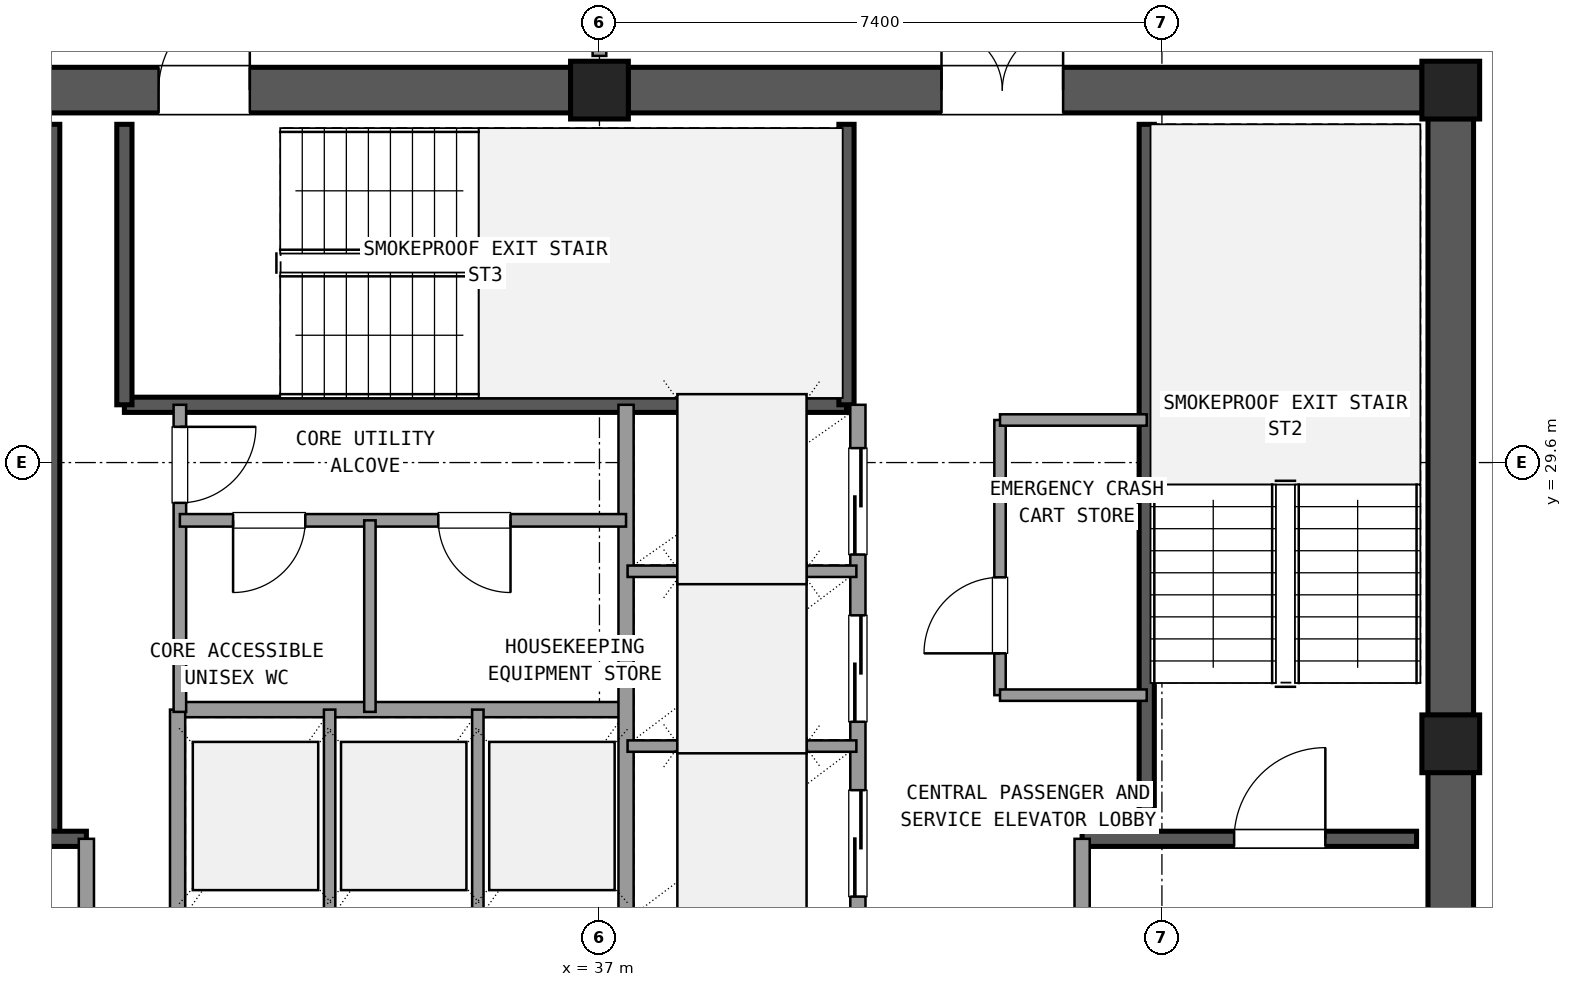
"""IFC4 building model, lengths in metres.
Left out: names, types, materials, properties, quantities, classifications, styles, units other than length and angle.
Written with IfcOpenShell. Run it as: python <this file> out.ifc"""

import sys

from ifc_helpers import new_model, si_unit, direction, frame, frame_2d, origin, origin_2d, place, context, subcontext, project, spatial, rectangle, extrude, element, fill, save


model = new_model("IFC4")
c1 = context("Model", 3, precision=1e-05, world=origin(), true_north=direction((0.0, 1.0)))
c2 = subcontext(c1, "Body", "Model", "MODEL_VIEW")
j1 = project(units=[si_unit("LENGTHUNIT", "METRE"), si_unit("PLANEANGLEUNIT", "RADIAN")], contexts=[c1])
p1 = place(None, origin())
s1 = spatial("IfcSite", under=j1, at=p1, CompositionType="ELEMENT")
p2 = place(p1, origin())
s2 = spatial("IfcBuilding", under=s1, at=p2, CompositionType="ELEMENT")
p3 = place(p2, frame((0.0, 0.0, 260.82)))
s3 = spatial("IfcBuildingStorey", under=s2, at=p3, CompositionType="ELEMENT", Elevation=260.82)
for number, where, z_axis, x_axis in (
    (1, (48.2, 25.9, 0.0), (0.0, 0.0, 1.0), (1.0, 0.0, 0.0)),
    (2, (48.2, 34.5, 0.0), (0.0, 0.0, 1.0), (1.0, 0.0, 0.0)),
    (3, (37.0, 34.5, 0.0), (0.0, 0.0, 1.0), (1.0, 0.0, 0.0)),
):
    element("IfcColumn", number, at=place(p3, frame(where, z_axis=z_axis, x_axis=x_axis)), inside=s3, PredefinedType="COLUMN", context=c2, shape_type="SweptSolid", body=[
        extrude(rectangle(XDim=0.76, YDim=0.76, at=origin_2d()), origin(), (0.0, 0.0, 1.0), 3.6),
    ])
p4 = place(p3, frame((48.2, 17.675, 0.0), z_axis=(0.0, 0.0, 1.0), x_axis=(0.0, 1.0, 0.0)))
e4 = element("IfcWall", 4, at=p4, inside=s3, PredefinedType="SHEAR", context=c2, shape_type="SweptSolid", body=[
    extrude(rectangle(XDim=7.85, YDim=0.6, at=frame_2d((3.925, 0.0))), origin(), (0.0, 0.0, 1.0), 3.32),
])
p5 = place(p4, frame((4.375, 0.0, 0.0)))
e5 = element("IfcOpeningElement", 5, at=p5, cuts=e4, PredefinedType="OPENING", context=c2, shape_type="SweptSolid", body=[
    extrude(rectangle(XDim=1.2, YDim=2.15, at=frame_2d((0.6, 1.075))), frame((0.0, 0.31, 0.0), z_axis=(0.0, -1.0, 0.0), x_axis=(1.0, 0.0, 0.0)), (0.0, 0.0, 1.0), 0.62),
])
p6 = place(p3, frame((48.2, 26.275, 0.0), z_axis=(0.0, 0.0, 1.0), x_axis=(0.0, 1.0, 0.0)))
e6 = element("IfcWall", 6, at=p6, inside=s3, PredefinedType="SHEAR", context=c2, shape_type="SweptSolid", body=[
    extrude(rectangle(XDim=7.85, YDim=0.6, at=frame_2d((3.925, 0.0))), origin(), (0.0, 0.0, 1.0), 3.32),
])
p7 = place(p3, frame((47.825, 34.5, 0.0), z_axis=(0.0, 0.0, 1.0), x_axis=(-1.0, 0.0, 0.0)))
e7 = element("IfcWall", 7, at=p7, inside=s3, PredefinedType="SHEAR", context=c2, shape_type="SweptSolid", body=[
    extrude(rectangle(XDim=10.45, YDim=0.6, at=frame_2d((5.225, 0.0))), origin(), (0.0, 0.0, 1.0), 3.32),
])
p8 = place(p7, frame((4.725, 0.0, 0.0)))
e8 = element("IfcOpeningElement", 8, at=p8, cuts=e7, PredefinedType="OPENING", context=c2, shape_type="SweptSolid", body=[
    extrude(rectangle(XDim=1.6, YDim=2.2, at=frame_2d((0.8, 1.1))), frame((0.0, 0.31, 0.0), z_axis=(0.0, -1.0, 0.0), x_axis=(1.0, 0.0, 0.0)), (0.0, 0.0, 1.0), 0.62),
])
p9 = place(p3, frame((36.625, 34.5, 0.0), z_axis=(0.0, 0.0, 1.0), x_axis=(-1.0, 0.0, 0.0)))
e9 = element("IfcWall", 9, at=p9, inside=s3, PredefinedType="SHEAR", context=c2, shape_type="SweptSolid", body=[
    extrude(rectangle(XDim=10.45, YDim=0.6, at=frame_2d((5.225, 0.0))), origin(), (0.0, 0.0, 1.0), 3.32),
])
p10 = place(p9, frame((4.225, 0.0, 0.0)))
e10 = element("IfcOpeningElement", 10, at=p10, cuts=e9, PredefinedType="OPENING", context=c2, shape_type="SweptSolid", body=[
    extrude(rectangle(XDim=1.2, YDim=2.15, at=frame_2d((0.6, 1.075))), frame((0.0, 0.31, 0.0), z_axis=(0.0, -1.0, 0.0), x_axis=(1.0, 0.0, 0.0)), (0.0, 0.0, 1.0), 0.62),
])
p11 = place(p3, frame((29.8, 24.65, 0.0), z_axis=(0.0, 0.0, 1.0), x_axis=(0.0, 1.0, 0.0)))
e11 = element("IfcWall", 11, at=p11, inside=s3, PredefinedType="SHEAR", context=c2, shape_type="SweptSolid", body=[
    extrude(rectangle(XDim=9.4, YDim=0.2, at=frame_2d((4.7, 0.0))), origin(), (0.0, 0.0, 1.0), 3.32),
])
p12 = place(p3, frame((26.25, 24.65, 0.0), z_axis=(0.0, 0.0, 1.0), x_axis=(1.0, 0.0, 0.0)))
e12 = element("IfcWall", 12, at=p12, inside=s3, PredefinedType="SHEAR", context=c2, shape_type="SweptSolid", body=[
    extrude(rectangle(XDim=4.0, YDim=0.2, at=frame_2d((2.0, 0.0))), origin(), (0.0, 0.0, 1.0), 3.32),
])
p13 = place(p12, frame((1.0, 0.0, 0.0)))
e13 = element("IfcOpeningElement", 13, at=p13, cuts=e12, PredefinedType="OPENING", context=c2, shape_type="SweptSolid", body=[
    extrude(rectangle(XDim=1.2, YDim=2.15, at=frame_2d((0.6, 1.075))), frame((0.0, 0.11, 0.0), z_axis=(0.0, -1.0, 0.0), x_axis=(1.0, 0.0, 0.0)), (0.0, 0.0, 1.0), 0.22),
])
p14 = place(p3, frame((44.2, 24.65, 0.0), z_axis=(0.0, 0.0, 1.0), x_axis=(0.0, 1.0, 0.0)))
e14 = element("IfcWall", 14, at=p14, inside=s3, PredefinedType="SHEAR", context=c2, shape_type="SweptSolid", body=[
    extrude(rectangle(XDim=9.4, YDim=0.2, at=frame_2d((4.7, 0.0))), origin(), (0.0, 0.0, 1.0), 3.32),
])
p15 = place(p3, frame((43.35, 24.65, 0.0), z_axis=(0.0, 0.0, 1.0), x_axis=(1.0, 0.0, 0.0)))
e15 = element("IfcWall", 15, at=p15, inside=s3, PredefinedType="SHEAR", context=c2, shape_type="SweptSolid", body=[
    extrude(rectangle(XDim=4.4, YDim=0.2, at=frame_2d((2.2, 0.0))), origin(), (0.0, 0.0, 1.0), 3.32),
])
p16 = place(p15, frame((2.0, 0.0, 0.0)))
e16 = element("IfcOpeningElement", 16, at=p16, cuts=e15, PredefinedType="OPENING", context=c2, shape_type="SweptSolid", body=[
    extrude(rectangle(XDim=1.2, YDim=2.15, at=frame_2d((0.6, 1.075))), frame((0.0, 0.11, 0.0), z_axis=(0.0, -1.0, 0.0), x_axis=(1.0, 0.0, 0.0)), (0.0, 0.0, 1.0), 0.22),
])
p17 = place(p3, frame((30.75, 30.36, 0.0), z_axis=(0.0, 0.0, 1.0), x_axis=(1.0, 0.0, 0.0)))
e17 = element("IfcWall", 17, at=p17, inside=s3, PredefinedType="SHEAR", context=c2, shape_type="SweptSolid", body=[
    extrude(rectangle(XDim=9.5, YDim=0.2, at=frame_2d((4.75, 0.0))), origin(), (0.0, 0.0, 1.0), 3.32),
])
for number, where, z_axis, x_axis in (
    (18, (30.75, 30.36, 0.0), (0.0, 0.0, 1.0), (0.0, 1.0, 0.0)),
    (19, (40.25, 30.36, 0.0), (0.0, 0.0, 1.0), (0.0, 1.0, 0.0)),
):
    element("IfcWall", number, at=place(p3, frame(where, z_axis=z_axis, x_axis=x_axis)), inside=s3, PredefinedType="SHEAR", context=c2, shape_type="SweptSolid", body=[
        extrude(rectangle(XDim=3.69, YDim=0.2, at=frame_2d((1.845, 0.0))), origin(), (0.0, 0.0, 1.0), 3.32),
    ])
p18 = place(p3, frame((30.25, 17.75, 0.0), z_axis=(0.0, 0.0, 1.0), x_axis=(0.0, 1.0, 0.0)))
e20 = element("IfcWall", 20, at=p18, inside=s3, PredefinedType="SOLIDWALL", context=c2, shape_type="SweptSolid", body=[
    extrude(rectangle(XDim=6.9, YDim=0.2, at=frame_2d((3.45, 0.0))), origin(), (0.0, 0.0, 1.0), 2.61),
])
p19 = place(p18, frame((4.15, 0.0, 0.0)))
e21 = element("IfcOpeningElement", 21, at=p19, cuts=e20, PredefinedType="OPENING", context=c2, shape_type="SweptSolid", body=[
    extrude(rectangle(XDim=1.2, YDim=2.15, at=frame_2d((0.6, 1.075))), frame((0.0, 0.11, 0.0), z_axis=(0.0, -1.0, 0.0), x_axis=(1.0, 0.0, 0.0)), (0.0, 0.0, 1.0), 0.22),
])
p20 = place(p3, frame((43.35, 17.75, 0.0), z_axis=(0.0, 0.0, 1.0), x_axis=(0.0, 1.0, 0.0)))
e22 = element("IfcWall", 22, at=p20, inside=s3, PredefinedType="SOLIDWALL", context=c2, shape_type="SweptSolid", body=[
    extrude(rectangle(XDim=6.9, YDim=0.2, at=frame_2d((3.45, 0.0))), origin(), (0.0, 0.0, 1.0), 2.61),
])
p21 = place(p20, frame((4.15, 0.0, 0.0)))
e23 = element("IfcOpeningElement", 23, at=p21, cuts=e22, PredefinedType="OPENING", context=c2, shape_type="SweptSolid", body=[
    extrude(rectangle(XDim=1.2, YDim=2.15, at=frame_2d((0.6, 1.075))), frame((0.0, 0.11, 0.0), z_axis=(0.0, -1.0, 0.0), x_axis=(1.0, 0.0, 0.0)), (0.0, 0.0, 1.0), 0.22),
])
p22 = place(p3, frame((31.45, 26.35, 0.0), z_axis=(0.0, 0.0, 1.0), x_axis=(1.0, 0.0, 0.0)))
e24 = element("IfcWall", 24, at=p22, inside=s3, PredefinedType="SOLIDWALL", context=c2, shape_type="SweptSolid", body=[
    extrude(rectangle(XDim=5.9, YDim=0.2, at=frame_2d((2.95, 0.0))), origin(), (0.0, 0.0, 1.0), 2.61),
])
p23 = place(p3, frame((31.45, 23.54, 0.0), z_axis=(0.0, 0.0, 1.0), x_axis=(0.0, 1.0, 0.0)))
e25 = element("IfcWall", 25, at=p23, inside=s3, PredefinedType="SOLIDWALL", context=c2, shape_type="SweptSolid", body=[
    extrude(rectangle(XDim=2.81, YDim=0.2, at=frame_2d((1.405, 0.0))), origin(), (0.0, 0.0, 1.0), 2.61),
])
for number, where, z_axis, x_axis in (
    (26, (33.45, 23.54, 0.0), (0.0, 0.0, 1.0), (0.0, 1.0, 0.0)),
    (27, (35.4, 23.54, 0.0), (0.0, 0.0, 1.0), (0.0, 1.0, 0.0)),
):
    element("IfcWall", number, at=place(p3, frame(where, z_axis=z_axis, x_axis=x_axis)), inside=s3, PredefinedType="PARTITIONING", context=c2, shape_type="SweptSolid", body=[
        extrude(rectangle(XDim=2.81, YDim=0.15, at=frame_2d((1.405, 0.0))), origin(), (0.0, 0.0, 1.0), 2.61),
    ])
p24 = place(p3, frame((37.35, 23.54, 0.0), z_axis=(0.0, 0.0, 1.0), x_axis=(0.0, 1.0, 0.0)))
e28 = element("IfcWall", 28, at=p24, inside=s3, PredefinedType="SOLIDWALL", context=c2, shape_type="SweptSolid", body=[
    extrude(rectangle(XDim=6.82, YDim=0.2, at=frame_2d((3.41, 0.0))), origin(), (0.0, 0.0, 1.0), 2.61),
])
p25 = place(p3, frame((40.4, 23.54, 0.0), z_axis=(0.0, 0.0, 1.0), x_axis=(0.0, 1.0, 0.0)))
e29 = element("IfcWall", 29, at=p25, inside=s3, PredefinedType="SOLIDWALL", context=c2, shape_type="SweptSolid", body=[
    extrude(rectangle(XDim=6.82, YDim=0.2, at=frame_2d((3.41, 0.0))), origin(), (0.0, 0.0, 1.0), 2.61),
])
p26 = place(p25, frame((0.35, 0.0, 0.0)))
e30 = element("IfcOpeningElement", 30, at=p26, cuts=e29, PredefinedType="OPENING", context=c2, shape_type="SweptSolid", body=[
    extrude(rectangle(XDim=1.4, YDim=2.2, at=frame_2d((0.7, 1.1))), frame((0.0, 0.11, 0.0), z_axis=(0.0, -1.0, 0.0), x_axis=(1.0, 0.0, 0.0)), (0.0, 0.0, 1.0), 0.22),
])
p27 = place(p25, frame((2.65, 0.0, 0.0)))
e31 = element("IfcOpeningElement", 31, at=p27, cuts=e29, PredefinedType="OPENING", context=c2, shape_type="SweptSolid", body=[
    extrude(rectangle(XDim=1.4, YDim=2.2, at=frame_2d((0.7, 1.1))), frame((0.0, 0.11, 0.0), z_axis=(0.0, -1.0, 0.0), x_axis=(1.0, 0.0, 0.0)), (0.0, 0.0, 1.0), 0.22),
])
p28 = place(p25, frame((4.85, 0.0, 0.0)))
e32 = element("IfcOpeningElement", 32, at=p28, cuts=e29, PredefinedType="OPENING", context=c2, shape_type="SweptSolid", body=[
    extrude(rectangle(XDim=1.4, YDim=2.2, at=frame_2d((0.7, 1.1))), frame((0.0, 0.11, 0.0), z_axis=(0.0, -1.0, 0.0), x_axis=(1.0, 0.0, 0.0)), (0.0, 0.0, 1.0), 0.22),
])
for number, where, z_axis, x_axis in (
    (33, (37.37, 25.87, 0.0), (0.0, 0.0, 1.0), (1.0, 0.0, 0.0)),
    (34, (37.37, 28.17, 0.0), (0.0, 0.0, 1.0), (1.0, 0.0, 0.0)),
):
    element("IfcWall", number, at=place(p3, frame(where, z_axis=z_axis, x_axis=x_axis)), inside=s3, PredefinedType="PARTITIONING", context=c2, shape_type="SweptSolid", body=[
        extrude(rectangle(XDim=3.01, YDim=0.15, at=frame_2d((1.505, 0.0))), origin(), (0.0, 0.0, 1.0), 2.61),
    ])
p29 = place(p3, frame((42.27, 26.54, 0.0), z_axis=(0.0, 0.0, 1.0), x_axis=(0.0, 1.0, 0.0)))
e35 = element("IfcWall", 35, at=p29, inside=s3, PredefinedType="PARTITIONING", context=c2, shape_type="SweptSolid", body=[
    extrude(rectangle(XDim=3.62, YDim=0.15, at=frame_2d((1.81, 0.0))), origin(), (0.0, 0.0, 1.0), 2.61),
])
p30 = place(p29, frame((0.55, 0.0, 0.0)))
e36 = element("IfcOpeningElement", 36, at=p30, cuts=e35, PredefinedType="OPENING", context=c2, shape_type="SweptSolid", body=[
    extrude(rectangle(XDim=1.0, YDim=2.15, at=frame_2d((0.5, 1.075))), frame((0.0, 0.085, 0.0), z_axis=(0.0, -1.0, 0.0), x_axis=(1.0, 0.0, 0.0)), (0.0, 0.0, 1.0), 0.17),
])
for number, where, z_axis, x_axis in (
    (37, (42.27, 26.54, 0.0), (0.0, 0.0, 1.0), (1.0, 0.0, 0.0)),
    (38, (42.27, 30.16, 0.0), (0.0, 0.0, 1.0), (1.0, 0.0, 0.0)),
):
    element("IfcWall", number, at=place(p3, frame(where, z_axis=z_axis, x_axis=x_axis)), inside=s3, PredefinedType="PARTITIONING", context=c2, shape_type="SweptSolid", body=[
        extrude(rectangle(XDim=1.93, YDim=0.15, at=frame_2d((0.965, 0.0))), origin(), (0.0, 0.0, 1.0), 2.61),
    ])
p31 = place(p3, frame((31.48, 26.32, 0.0), z_axis=(0.0, 0.0, 1.0), x_axis=(0.0, 1.0, 0.0)))
e39 = element("IfcWall", 39, at=p31, inside=s3, PredefinedType="PLUMBINGWALL", context=c2, shape_type="SweptSolid", body=[
    extrude(rectangle(XDim=4.04, YDim=0.165, at=frame_2d((2.02, 0.0))), origin(), (0.0, 0.0, 1.0), 2.61),
])
p32 = place(p31, frame((2.75, 0.0, 0.0)))
e40 = element("IfcOpeningElement", 40, at=p32, cuts=e39, PredefinedType="OPENING", context=c2, shape_type="SweptSolid", body=[
    extrude(rectangle(XDim=1.0, YDim=2.15, at=frame_2d((0.5, 1.075))), frame((0.0, 0.093, 0.0), z_axis=(0.0, -1.0, 0.0), x_axis=(1.0, 0.0, 0.0)), (0.0, 0.0, 1.0), 0.185),
])
p33 = place(p3, frame((31.48, 28.84, 0.0), z_axis=(0.0, 0.0, 1.0), x_axis=(1.0, 0.0, 0.0)))
e41 = element("IfcWall", 41, at=p33, inside=s3, PredefinedType="PLUMBINGWALL", context=c2, shape_type="SweptSolid", body=[
    extrude(rectangle(XDim=5.87, YDim=0.165, at=frame_2d((2.935, 0.0))), origin(), (0.0, 0.0, 1.0), 2.61),
])
p34 = place(p33, frame((0.7, 0.0, 0.0)))
e42 = element("IfcOpeningElement", 42, at=p34, cuts=e41, PredefinedType="OPENING", context=c2, shape_type="SweptSolid", body=[
    extrude(rectangle(XDim=0.95, YDim=2.1, at=frame_2d((0.475, 1.05))), frame((0.0, 0.093, 0.0), z_axis=(0.0, -1.0, 0.0), x_axis=(1.0, 0.0, 0.0)), (0.0, 0.0, 1.0), 0.185),
])
p35 = place(p33, frame((3.4, 0.0, 0.0)))
e43 = element("IfcOpeningElement", 43, at=p35, cuts=e41, PredefinedType="OPENING", context=c2, shape_type="SweptSolid", body=[
    extrude(rectangle(XDim=0.95, YDim=2.1, at=frame_2d((0.475, 1.05))), frame((0.0, 0.093, 0.0), z_axis=(0.0, -1.0, 0.0), x_axis=(1.0, 0.0, 0.0)), (0.0, 0.0, 1.0), 0.185),
])
p36 = place(p3, frame((33.98, 26.32, 0.0), z_axis=(0.0, 0.0, 1.0), x_axis=(0.0, 1.0, 0.0)))
e44 = element("IfcWall", 44, at=p36, inside=s3, PredefinedType="PARTITIONING", context=c2, shape_type="SweptSolid", body=[
    extrude(rectangle(XDim=2.52, YDim=0.15, at=frame_2d((1.26, 0.0))), origin(), (0.0, 0.0, 1.0), 2.61),
])
p37 = place(p3, frame((37.0, 34.95, 0.0), z_axis=(0.0, 0.0, 1.0), x_axis=(0.0, 1.0, 0.0)))
e45 = element("IfcWall", 45, at=p37, inside=s3, PredefinedType="PARTITIONING", context=c2, shape_type="SweptSolid", body=[
    extrude(rectangle(XDim=2.7, YDim=0.18, at=frame_2d((1.35, 0.0))), origin(), (0.0, 0.0, 1.0), 2.61),
])
p38 = place(p37, frame((0.35, 0.0, 0.0)))
e46 = element("IfcOpeningElement", 46, at=p38, cuts=e45, PredefinedType="OPENING", context=c2, shape_type="SweptSolid", body=[
    extrude(rectangle(XDim=2.0, YDim=2.2, at=frame_2d((1.0, 1.1))), frame((0.0, 0.1, 0.0), z_axis=(0.0, -1.0, 0.0), x_axis=(1.0, 0.0, 0.0)), (0.0, 0.0, 1.0), 0.2),
])
p39 = place(p16, origin())
e47 = element("IfcDoor", 47, at=p39, inside=s3, OperationType="SINGLE_SWING_RIGHT", PredefinedType="DOOR", context=c2, shape_type="SweptSolid", body=[
    extrude(rectangle(XDim=1.2, YDim=2.15, at=frame_2d((0.6, 1.075))), frame((0.0, 0.025, 0.0), z_axis=(0.0, -1.0, 0.0), x_axis=(1.0, 0.0, 0.0)), (0.0, 0.0, 1.0), 0.05),
])
fill(e16, e47)
p40 = place(p8, frame((1.6, 0.0, 0.0), z_axis=(0.0, 0.0, 1.0), x_axis=(-1.0, 0.0, 0.0)))
e48 = element("IfcDoor", 48, at=p40, inside=s3, OperationType="DOUBLE_DOOR_SINGLE_SWING", PredefinedType="DOOR", context=c2, shape_type="SweptSolid", body=[
    extrude(rectangle(XDim=1.6, YDim=2.2, at=frame_2d((0.8, 1.1))), frame((0.0, 0.025, 0.0), z_axis=(0.0, -1.0, 0.0), x_axis=(1.0, 0.0, 0.0)), (0.0, 0.0, 1.0), 0.05),
])
fill(e8, e48)
p41 = place(p10, frame((1.2, 0.0, 0.0), z_axis=(0.0, 0.0, 1.0), x_axis=(-1.0, 0.0, 0.0)))
e49 = element("IfcDoor", 49, at=p41, inside=s3, OperationType="SINGLE_SWING_LEFT", PredefinedType="DOOR", context=c2, shape_type="SweptSolid", body=[
    extrude(rectangle(XDim=1.2, YDim=2.15, at=frame_2d((0.6, 1.075))), frame((0.0, 0.025, 0.0), z_axis=(0.0, -1.0, 0.0), x_axis=(1.0, 0.0, 0.0)), (0.0, 0.0, 1.0), 0.05),
])
fill(e10, e49)
p42 = place(p26, origin())
e50 = element("IfcDoor", 50, at=p42, inside=s3, OperationType="SLIDING_TO_LEFT", PredefinedType="DOOR", context=c2, shape_type="SweptSolid", body=[
    extrude(rectangle(XDim=1.4, YDim=2.2, at=frame_2d((0.7, 1.1))), frame((0.0, 0.025, 0.0), z_axis=(0.0, -1.0, 0.0), x_axis=(1.0, 0.0, 0.0)), (0.0, 0.0, 1.0), 0.05),
])
fill(e30, e50)
p43 = place(p27, origin())
e51 = element("IfcDoor", 51, at=p43, inside=s3, OperationType="SLIDING_TO_LEFT", PredefinedType="DOOR", context=c2, shape_type="SweptSolid", body=[
    extrude(rectangle(XDim=1.4, YDim=2.2, at=frame_2d((0.7, 1.1))), frame((0.0, 0.025, 0.0), z_axis=(0.0, -1.0, 0.0), x_axis=(1.0, 0.0, 0.0)), (0.0, 0.0, 1.0), 0.05),
])
fill(e31, e51)
p44 = place(p28, origin())
e52 = element("IfcDoor", 52, at=p44, inside=s3, OperationType="SLIDING_TO_RIGHT", PredefinedType="DOOR", context=c2, shape_type="SweptSolid", body=[
    extrude(rectangle(XDim=1.4, YDim=2.2, at=frame_2d((0.7, 1.1))), frame((0.0, 0.025, 0.0), z_axis=(0.0, -1.0, 0.0), x_axis=(1.0, 0.0, 0.0)), (0.0, 0.0, 1.0), 0.05),
])
fill(e32, e52)
p45 = place(p30, origin())
e53 = element("IfcDoor", 53, at=p45, inside=s3, OperationType="SINGLE_SWING_LEFT", PredefinedType="DOOR", context=c2, shape_type="SweptSolid", body=[
    extrude(rectangle(XDim=1.0, YDim=2.15, at=frame_2d((0.5, 1.075))), frame((0.0, 0.025, 0.0), z_axis=(0.0, -1.0, 0.0), x_axis=(1.0, 0.0, 0.0)), (0.0, 0.0, 1.0), 0.05),
])
fill(e36, e53)
p46 = place(p32, frame((1.0, 0.0, 0.0), z_axis=(0.0, 0.0, 1.0), x_axis=(-1.0, 0.0, 0.0)))
e54 = element("IfcDoor", 54, at=p46, inside=s3, OperationType="SINGLE_SWING_RIGHT", PredefinedType="DOOR", context=c2, shape_type="SweptSolid", body=[
    extrude(rectangle(XDim=1.0, YDim=2.15, at=frame_2d((0.5, 1.075))), frame((0.0, 0.025, 0.0), z_axis=(0.0, -1.0, 0.0), x_axis=(1.0, 0.0, 0.0)), (0.0, 0.0, 1.0), 0.05),
])
fill(e40, e54)
p47 = place(p34, frame((0.95, 0.0, 0.0), z_axis=(0.0, 0.0, 1.0), x_axis=(-1.0, 0.0, 0.0)))
e55 = element("IfcDoor", 55, at=p47, inside=s3, OperationType="SINGLE_SWING_LEFT", PredefinedType="DOOR", context=c2, shape_type="SweptSolid", body=[
    extrude(rectangle(XDim=0.95, YDim=2.1, at=frame_2d((0.475, 1.05))), frame((0.0, 0.025, 0.0), z_axis=(0.0, -1.0, 0.0), x_axis=(1.0, 0.0, 0.0)), (0.0, 0.0, 1.0), 0.05),
])
fill(e42, e55)
p48 = place(p35, frame((0.95, 0.0, 0.0), z_axis=(0.0, 0.0, 1.0), x_axis=(-1.0, 0.0, 0.0)))
e56 = element("IfcDoor", 56, at=p48, inside=s3, OperationType="SINGLE_SWING_RIGHT", PredefinedType="DOOR", context=c2, shape_type="SweptSolid", body=[
    extrude(rectangle(XDim=0.95, YDim=2.1, at=frame_2d((0.475, 1.05))), frame((0.0, 0.025, 0.0), z_axis=(0.0, -1.0, 0.0), x_axis=(1.0, 0.0, 0.0)), (0.0, 0.0, 1.0), 0.05),
])
fill(e43, e56)
save(model, sys.argv[1])
